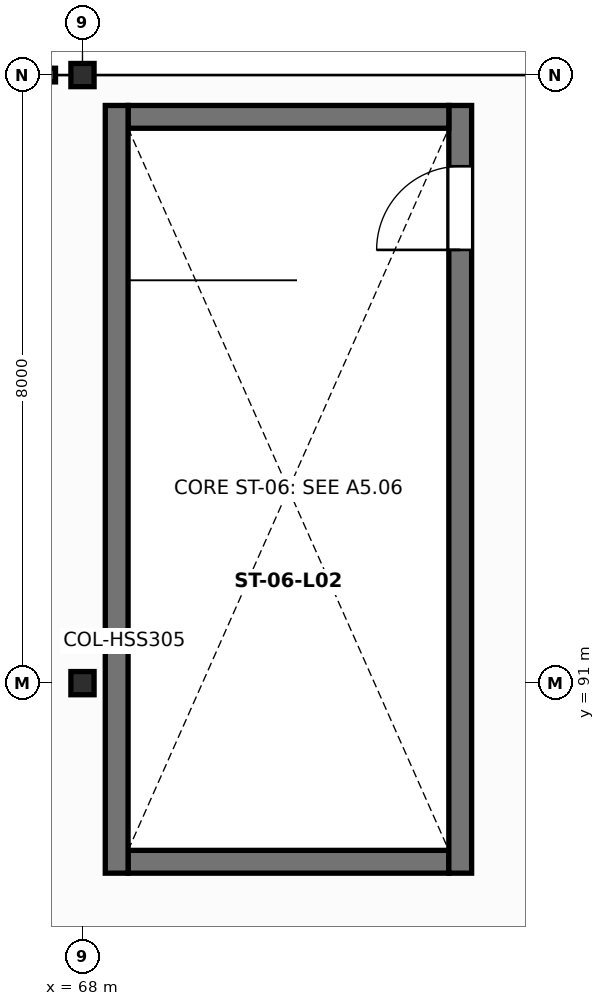
"""IFC4 building model, lengths in metres.
Left out: names, types, materials, properties, quantities, classifications, styles, units other than length and angle.
Written with IfcOpenShell. Run it as: python <this file> out.ifc"""

import sys

from ifc_helpers import new_model, si_unit, direction, frame, frame_2d, origin, origin_2d, place, context, subcontext, project, spatial, rectangle, hollow_rectangle, extrude, element, fill, save


model = new_model("IFC4")
c1 = context("Model", 3, precision=1e-05, world=origin(), true_north=direction((0.0, 1.0)))
c2 = subcontext(c1, "Body", "Model", "MODEL_VIEW")
j1 = project(units=[si_unit("LENGTHUNIT", "METRE"), si_unit("PLANEANGLEUNIT", "RADIAN")], contexts=[c1])
p1 = place(None, origin())
s1 = spatial("IfcSite", under=j1, at=p1, CompositionType="ELEMENT")
p2 = place(p1, origin())
s2 = spatial("IfcBuilding", under=s1, at=p2, CompositionType="ELEMENT")
p3 = place(p2, frame((0.0, 0.0, 11.2)))
s3 = spatial("IfcBuildingStorey", under=s2, at=p3, CompositionType="ELEMENT", Elevation=11.2)
for number, where, z_axis, x_axis in (
    (1, (68.0, 91.0, 0.0), (0.0, 0.0, 1.0), (1.0, 0.0, 0.0)),
    (2, (68.0, 99.0, 0.0), (0.0, 0.0, 1.0), (1.0, 0.0, 0.0)),
):
    element("IfcColumn", number, at=place(p3, frame(where, z_axis=z_axis, x_axis=x_axis)), inside=s3, PredefinedType="COLUMN", context=c2, shape_type="SweptSolid", body=[
        extrude(hollow_rectangle(XDim=0.305, YDim=0.305, WallThickness=0.012, at=origin_2d()), origin(), (0.0, 0.0, 1.0), 4.3),
    ])
p4 = place(p3, frame((68.6, 88.65, 0.0), z_axis=(0.0, 0.0, 1.0), x_axis=(1.0, 0.0, 0.0)))
e3 = element("IfcWall", 3, at=p4, inside=s3, PredefinedType="SHEAR", context=c2, shape_type="SweptSolid", body=[
    extrude(rectangle(XDim=4.22, YDim=0.3, at=frame_2d((2.11, 0.0))), origin(), (0.0, 0.0, 1.0), 4.12),
])
p5 = place(p3, frame((72.97, 88.5, 0.0), z_axis=(0.0, 0.0, 1.0), x_axis=(0.0, 1.0, 0.0)))
e4 = element("IfcWall", 4, at=p5, inside=s3, PredefinedType="SHEAR", context=c2, shape_type="SweptSolid", body=[
    extrude(rectangle(XDim=10.1, YDim=0.3, at=frame_2d((5.05, 0.0))), origin(), (0.0, 0.0, 1.0), 4.12),
])
p6 = place(p5, frame((8.2, 0.0, 0.0)))
e5 = element("IfcOpeningElement", 5, at=p6, cuts=e4, PredefinedType="OPENING", context=c2, shape_type="SweptSolid", body=[
    extrude(rectangle(XDim=1.1, YDim=2.15, at=frame_2d((0.55, 1.075))), frame((0.0, 0.16, 0.0), z_axis=(0.0, -1.0, 0.0), x_axis=(1.0, 0.0, 0.0)), (0.0, 0.0, 1.0), 0.32),
])
p7 = place(p3, frame((72.82, 98.45, 0.0), z_axis=(0.0, 0.0, 1.0), x_axis=(-1.0, 0.0, 0.0)))
e6 = element("IfcWall", 6, at=p7, inside=s3, PredefinedType="SHEAR", context=c2, shape_type="SweptSolid", body=[
    extrude(rectangle(XDim=4.22, YDim=0.3, at=frame_2d((2.11, 0.0))), origin(), (0.0, 0.0, 1.0), 4.12),
])
p8 = place(p3, frame((68.45, 98.6, 0.0), z_axis=(0.0, 0.0, 1.0), x_axis=(0.0, -1.0, 0.0)))
e7 = element("IfcWall", 7, at=p8, inside=s3, PredefinedType="SHEAR", context=c2, shape_type="SweptSolid", body=[
    extrude(rectangle(XDim=10.1, YDim=0.3, at=frame_2d((5.05, 0.0))), origin(), (0.0, 0.0, 1.0), 4.12),
])
p9 = place(p6, origin())
e8 = element("IfcDoor", 8, at=p9, inside=s3, OperationType="SINGLE_SWING_LEFT", PredefinedType="DOOR", context=c2, shape_type="SweptSolid", body=[
    extrude(rectangle(XDim=1.1, YDim=2.15, at=frame_2d((0.55, 1.075))), frame((0.0, 0.025, 0.0), z_axis=(0.0, -1.0, 0.0), x_axis=(1.0, 0.0, 0.0)), (0.0, 0.0, 1.0), 0.05),
])
fill(e5, e8)
save(model, sys.argv[1])
